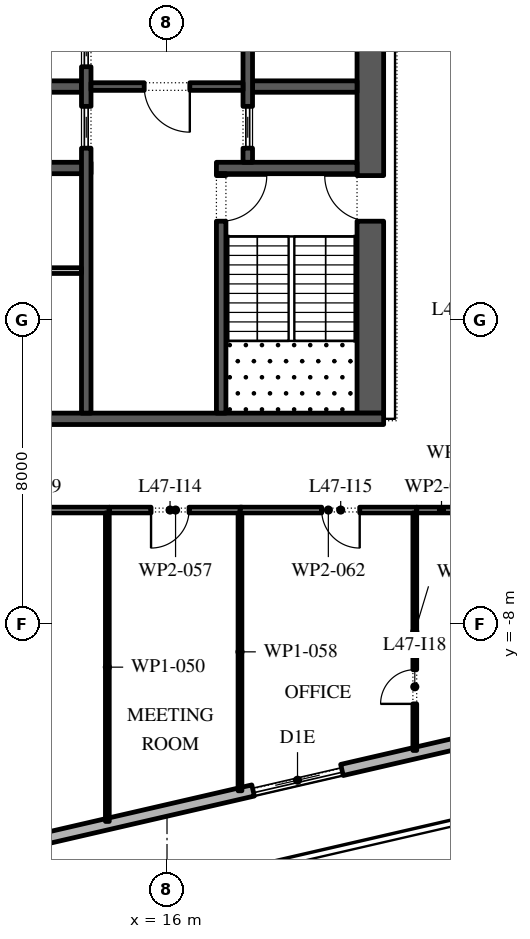
"""IFC4 building model, lengths in metres.
Left out: names, types, materials, properties, quantities, classifications, styles, units other than length and angle.
Written with IfcOpenShell. Run it as: python <this file> out.ifc"""

import sys

from ifc_helpers import new_model, si_unit, direction, frame, frame_2d, origin, place, context, subcontext, project, spatial, rectangle, extrude, element, fill, save


model = new_model("IFC4")
c1 = context("Model", 3, precision=1e-05, world=origin(), true_north=direction((0.0, 1.0)))
c2 = subcontext(c1, "Body", "Model", "MODEL_VIEW")
j1 = project(units=[si_unit("LENGTHUNIT", "METRE"), si_unit("PLANEANGLEUNIT", "RADIAN")], contexts=[c1])
p1 = place(None, origin())
s1 = spatial("IfcSite", under=j1, at=p1, CompositionType="ELEMENT")
p2 = place(p1, origin())
s2 = spatial("IfcBuilding", under=s1, at=p2, CompositionType="ELEMENT")
p3 = place(p2, frame((0.0, 0.0, 213.6)))
s3 = spatial("IfcBuildingStorey", under=s2, at=p3, CompositionType="ELEMENT", Elevation=213.6)
p4 = place(p3, frame((-17.592, -20.657, 0.0), z_axis=(0.0, 0.0, 1.0), x_axis=(0.974370243697, 0.224950279389, 0.0)))
e1 = element("IfcWall", 1, at=p4, inside=s3, PredefinedType="STANDARD", context=c2, shape_type="SweptSolid", body=[
    extrude(rectangle(XDim=49.5, YDim=0.3, at=frame_2d((24.75, 0.0))), origin(), (0.0, 0.0, 1.0), 4.0),
])
p5 = place(p4, frame((2.8, 0.0, 0.0)))
e2 = element("IfcOpeningElement", 2, at=p5, cuts=e1, PredefinedType="OPENING", context=c2, shape_type="SweptSolid", body=[
    extrude(rectangle(XDim=2.4, YDim=3.5, at=frame_2d((1.2, 1.75))), frame((0.0, 0.16, 0.0), z_axis=(0.0, -1.0, 0.0), x_axis=(1.0, 0.0, 0.0)), (0.0, 0.0, 1.0), 0.32),
])
p6 = place(p4, frame((9.9, 0.0, 0.45)))
e3 = element("IfcOpeningElement", 3, at=p6, cuts=e1, PredefinedType="OPENING", context=c2, shape_type="SweptSolid", body=[
    extrude(rectangle(XDim=4.5, YDim=2.575, at=frame_2d((2.25, 1.288))), frame((0.0, 0.16, 0.0), z_axis=(0.0, -1.0, 0.0), x_axis=(1.0, 0.0, 0.0)), (0.0, 0.0, 1.0), 0.32),
])
p7 = place(p4, frame((18.2, 0.0, 0.45)))
e4 = element("IfcOpeningElement", 4, at=p7, cuts=e1, PredefinedType="OPENING", context=c2, shape_type="SweptSolid", body=[
    extrude(rectangle(XDim=4.5, YDim=2.675, at=frame_2d((2.25, 1.337))), frame((0.0, 0.16, 0.0), z_axis=(0.0, -1.0, 0.0), x_axis=(1.0, 0.0, 0.0)), (0.0, 0.0, 1.0), 0.32),
])
p8 = place(p4, frame((26.5, 0.0, 0.45)))
e5 = element("IfcOpeningElement", 5, at=p8, cuts=e1, PredefinedType="OPENING", context=c2, shape_type="SweptSolid", body=[
    extrude(rectangle(XDim=4.5, YDim=2.75, at=frame_2d((2.25, 1.375))), frame((0.0, 0.16, 0.0), z_axis=(0.0, -1.0, 0.0), x_axis=(1.0, 0.0, 0.0)), (0.0, 0.0, 1.0), 0.32),
])
p9 = place(p4, frame((36.8, 0.0, 0.0)))
e6 = element("IfcOpeningElement", 6, at=p9, cuts=e1, PredefinedType="OPENING", context=c2, shape_type="SweptSolid", body=[
    extrude(rectangle(XDim=2.4, YDim=3.275, at=frame_2d((1.2, 1.637))), frame((0.0, 0.16, 0.0), z_axis=(0.0, -1.0, 0.0), x_axis=(1.0, 0.0, 0.0)), (0.0, 0.0, 1.0), 0.32),
])
p10 = place(p4, frame((43.1, 0.0, 0.45)))
e7 = element("IfcOpeningElement", 7, at=p10, cuts=e1, PredefinedType="OPENING", context=c2, shape_type="SweptSolid", body=[
    extrude(rectangle(XDim=4.5, YDim=2.875, at=frame_2d((2.25, 1.438))), frame((0.0, 0.16, 0.0), z_axis=(0.0, -1.0, 0.0), x_axis=(1.0, 0.0, 0.0)), (0.0, 0.0, 1.0), 0.32),
])
p11 = place(p3, frame((33.157, -5.092, 0.0), z_axis=(0.0, 0.0, 1.0), x_axis=(-0.224950279389, 0.974370243697, 0.0)))
e8 = element("IfcWall", 8, at=p11, inside=s3, PredefinedType="STANDARD", context=c2, shape_type="SweptSolid", body=[
    extrude(rectangle(XDim=49.5, YDim=0.3, at=frame_2d((24.75, 0.0))), origin(), (0.0, 0.0, 1.0), 4.0),
])
p12 = place(p11, frame((2.207, 0.0, 0.0)))
e9 = element("IfcOpeningElement", 9, at=p12, cuts=e8, PredefinedType="OPENING", context=c2, shape_type="SweptSolid", body=[
    extrude(rectangle(XDim=2.4, YDim=3.125, at=frame_2d((1.2, 1.562))), frame((0.0, 0.16, 0.0), z_axis=(0.0, -1.0, 0.0), x_axis=(1.0, 0.0, 0.0)), (0.0, 0.0, 1.0), 0.32),
])
p13 = place(p11, frame((8.121, 0.0, 0.45)))
e10 = element("IfcOpeningElement", 10, at=p13, cuts=e8, PredefinedType="OPENING", context=c2, shape_type="SweptSolid", body=[
    extrude(rectangle(XDim=4.5, YDim=2.875, at=frame_2d((2.25, 1.438))), frame((0.0, 0.16, 0.0), z_axis=(0.0, -1.0, 0.0), x_axis=(1.0, 0.0, 0.0)), (0.0, 0.0, 1.0), 0.32),
])
p14 = place(p11, frame((15.236, 0.0, 0.45)))
e11 = element("IfcOpeningElement", 11, at=p14, cuts=e8, PredefinedType="OPENING", context=c2, shape_type="SweptSolid", body=[
    extrude(rectangle(XDim=4.5, YDim=2.875, at=frame_2d((2.25, 1.438))), frame((0.0, 0.16, 0.0), z_axis=(0.0, -1.0, 0.0), x_axis=(1.0, 0.0, 0.0)), (0.0, 0.0, 1.0), 0.32),
])
p15 = place(p11, frame((22.35, 0.0, 0.45)))
e12 = element("IfcOpeningElement", 12, at=p15, cuts=e8, PredefinedType="OPENING", context=c2, shape_type="SweptSolid", body=[
    extrude(rectangle(XDim=4.5, YDim=3.0, at=frame_2d((2.25, 1.5))), frame((0.0, 0.16, 0.0), z_axis=(0.0, -1.0, 0.0), x_axis=(1.0, 0.0, 0.0)), (0.0, 0.0, 1.0), 0.32),
])
p16 = place(p11, frame((30.514, 0.0, 0.0)))
e13 = element("IfcOpeningElement", 13, at=p16, cuts=e8, PredefinedType="OPENING", context=c2, shape_type="SweptSolid", body=[
    extrude(rectangle(XDim=2.4, YDim=3.45, at=frame_2d((1.2, 1.725))), frame((0.0, 0.16, 0.0), z_axis=(0.0, -1.0, 0.0), x_axis=(1.0, 0.0, 0.0)), (0.0, 0.0, 1.0), 0.32),
])
p17 = place(p11, frame((36.579, 0.0, 0.45)))
e14 = element("IfcOpeningElement", 14, at=p17, cuts=e8, PredefinedType="OPENING", context=c2, shape_type="SweptSolid", body=[
    extrude(rectangle(XDim=4.5, YDim=3.05, at=frame_2d((2.25, 1.525))), frame((0.0, 0.16, 0.0), z_axis=(0.0, -1.0, 0.0), x_axis=(1.0, 0.0, 0.0)), (0.0, 0.0, 1.0), 0.32),
])
p18 = place(p11, frame((43.693, 0.0, 0.45)))
e15 = element("IfcOpeningElement", 15, at=p18, cuts=e8, PredefinedType="OPENING", context=c2, shape_type="SweptSolid", body=[
    extrude(rectangle(XDim=4.5, YDim=3.05, at=frame_2d((2.25, 1.525))), frame((0.0, 0.16, 0.0), z_axis=(0.0, -1.0, 0.0), x_axis=(1.0, 0.0, 0.0)), (0.0, 0.0, 1.0), 0.32),
])
p19 = place(p3, frame((21.35, -2.45, 0.0), z_axis=(0.0, 0.0, 1.0), x_axis=(0.0, 1.0, 0.0)))
e16 = element("IfcWall", 16, at=p19, inside=s3, PredefinedType="SHEAR", context=c2, shape_type="SweptSolid", body=[
    extrude(rectangle(XDim=27.9, YDim=0.7, at=frame_2d((13.95, 0.0))), origin(), (0.0, 0.0, 1.0), 4.0),
])
p20 = place(p19, frame((5.05, 0.0, 0.0)))
e17 = element("IfcOpeningElement", 17, at=p20, cuts=e16, PredefinedType="OPENING", context=c2, shape_type="SweptSolid", body=[
    extrude(rectangle(XDim=1.2, YDim=2.1, at=frame_2d((0.6, 1.05))), frame((0.0, 0.36, 0.0), z_axis=(0.0, -1.0, 0.0), x_axis=(1.0, 0.0, 0.0)), (0.0, 0.0, 1.0), 0.72),
])
p21 = place(p19, frame((21.65, 0.0, 0.0)))
e18 = element("IfcOpeningElement", 18, at=p21, cuts=e16, PredefinedType="OPENING", context=c2, shape_type="SweptSolid", body=[
    extrude(rectangle(XDim=1.2, YDim=2.1, at=frame_2d((0.6, 1.05))), frame((0.0, 0.36, 0.0), z_axis=(0.0, -1.0, 0.0), x_axis=(1.0, 0.0, 0.0)), (0.0, 0.0, 1.0), 0.72),
])
p22 = place(p3, frame((10.3, -2.6, 0.0), z_axis=(0.0, 0.0, 1.0), x_axis=(1.0, 0.0, 0.0)))
e19 = element("IfcWall", 19, at=p22, inside=s3, PredefinedType="SHEAR", context=c2, shape_type="SweptSolid", body=[
    extrude(rectangle(XDim=11.4, YDim=0.3, at=frame_2d((5.7, 0.0))), origin(), (0.0, 0.0, 1.0), 4.0),
])
p23 = place(p3, frame((17.3, 4.0, 0.0), z_axis=(0.0, 0.0, 1.0), x_axis=(1.0, 0.0, 0.0)))
e20 = element("IfcWall", 20, at=p23, inside=s3, PredefinedType="SHEAR", context=c2, shape_type="SweptSolid", body=[
    extrude(rectangle(XDim=3.7, YDim=0.3, at=frame_2d((1.85, 0.0))), origin(), (0.0, 0.0, 1.0), 4.0),
])
p24 = place(p3, frame((17.425, -2.45, 0.0), z_axis=(0.0, 0.0, 1.0), x_axis=(0.0, 1.0, 0.0)))
e21 = element("IfcWall", 21, at=p24, inside=s3, PredefinedType="SHEAR", context=c2, shape_type="SweptSolid", body=[
    extrude(rectangle(XDim=6.3, YDim=0.25, at=frame_2d((3.15, 0.0))), origin(), (0.0, 0.0, 1.0), 4.0),
])
p25 = place(p24, frame((5.05, 0.0, 0.0)))
e22 = element("IfcOpeningElement", 22, at=p25, cuts=e21, PredefinedType="OPENING", context=c2, shape_type="SweptSolid", body=[
    extrude(rectangle(XDim=1.2, YDim=2.1, at=frame_2d((0.6, 1.05))), frame((0.0, 0.135, 0.0), z_axis=(0.0, -1.0, 0.0), x_axis=(1.0, 0.0, 0.0)), (0.0, 0.0, 1.0), 0.27),
])
p26 = place(p3, frame((18.25, 6.143, 0.0), z_axis=(0.0, 0.0, 1.0), x_axis=(1.0, 0.0, 0.0)))
e23 = element("IfcWall", 23, at=p26, inside=s3, PredefinedType="SHEAR", context=c2, shape_type="SweptSolid", body=[
    extrude(rectangle(XDim=2.75, YDim=0.3, at=frame_2d((1.375, 0.0))), origin(), (0.0, 0.0, 1.0), 4.0),
])
p27 = place(p3, frame((18.125, 4.15, 0.0), z_axis=(0.0, 0.0, 1.0), x_axis=(0.0, 1.0, 0.0)))
e24 = element("IfcWall", 24, at=p27, inside=s3, PredefinedType="SHEAR", context=c2, shape_type="SweptSolid", body=[
    extrude(rectangle(XDim=14.7, YDim=0.25, at=frame_2d((7.35, 0.0))), origin(), (0.0, 0.0, 1.0), 4.0),
])
p28 = place(p27, frame((3.446, 0.0, 0.0)))
e25 = element("IfcOpeningElement", 25, at=p28, cuts=e24, PredefinedType="OPENING", context=c2, shape_type="SweptSolid", body=[
    extrude(rectangle(XDim=0.9, YDim=2.1, at=frame_2d((0.45, 1.05))), frame((0.0, 0.135, 0.0), z_axis=(0.0, -1.0, 0.0), x_axis=(1.0, 0.0, 0.0)), (0.0, 0.0, 1.0), 0.27),
])
p29 = place(p27, frame((6.9, 0.0, 0.0)))
e26 = element("IfcOpeningElement", 26, at=p29, cuts=e24, PredefinedType="OPENING", context=c2, shape_type="SweptSolid", body=[
    extrude(rectangle(XDim=0.9, YDim=2.1, at=frame_2d((0.45, 1.05))), frame((0.0, 0.135, 0.0), z_axis=(0.0, -1.0, 0.0), x_axis=(1.0, 0.0, 0.0)), (0.0, 0.0, 1.0), 0.27),
])
p30 = place(p27, frame((10.354, 0.0, 0.0)))
e27 = element("IfcOpeningElement", 27, at=p30, cuts=e24, PredefinedType="OPENING", context=c2, shape_type="SweptSolid", body=[
    extrude(rectangle(XDim=0.9, YDim=2.1, at=frame_2d((0.45, 1.05))), frame((0.0, 0.135, 0.0), z_axis=(0.0, -1.0, 0.0), x_axis=(1.0, 0.0, 0.0)), (0.0, 0.0, 1.0), 0.27),
])
p31 = place(p27, frame((0.371, 0.0, 0.0)))
e28 = element("IfcOpeningElement", 28, at=p31, cuts=e24, PredefinedType="OPENING", context=c2, shape_type="SweptSolid", body=[
    extrude(rectangle(XDim=1.1, YDim=2.1, at=frame_2d((0.55, 1.05))), frame((0.0, 0.135, 0.0), z_axis=(0.0, -1.0, 0.0), x_axis=(1.0, 0.0, 0.0)), (0.0, 0.0, 1.0), 0.27),
])
p32 = place(p27, frame((13.229, 0.0, 0.0)))
e29 = element("IfcOpeningElement", 29, at=p32, cuts=e24, PredefinedType="OPENING", context=c2, shape_type="SweptSolid", body=[
    extrude(rectangle(XDim=1.1, YDim=2.1, at=frame_2d((0.55, 1.05))), frame((0.0, 0.135, 0.0), z_axis=(0.0, -1.0, 0.0), x_axis=(1.0, 0.0, 0.0)), (0.0, 0.0, 1.0), 0.27),
])
p33 = place(p3, frame((11.0, 4.0, 0.0), z_axis=(0.0, 0.0, 1.0), x_axis=(1.0, 0.0, 0.0)))
e30 = element("IfcWall", 30, at=p33, inside=s3, PredefinedType="SHEAR", context=c2, shape_type="SweptSolid", body=[
    extrude(rectangle(XDim=3.0, YDim=0.3, at=frame_2d((1.5, 0.0))), origin(), (0.0, 0.0, 1.0), 4.0),
])
p34 = place(p3, frame((11.0, 6.143, 0.0), z_axis=(0.0, 0.0, 1.0), x_axis=(1.0, 0.0, 0.0)))
e31 = element("IfcWall", 31, at=p34, inside=s3, PredefinedType="SHEAR", context=c2, shape_type="SweptSolid", body=[
    extrude(rectangle(XDim=2.75, YDim=0.3, at=frame_2d((1.375, 0.0))), origin(), (0.0, 0.0, 1.0), 4.0),
])
p35 = place(p3, frame((13.875, -2.45, 0.0), z_axis=(0.0, 0.0, 1.0), x_axis=(0.0, 1.0, 0.0)))
e32 = element("IfcWall", 32, at=p35, inside=s3, PredefinedType="SHEAR", context=c2, shape_type="SweptSolid", body=[
    extrude(rectangle(XDim=21.3, YDim=0.25, at=frame_2d((10.65, 0.0))), origin(), (0.0, 0.0, 1.0), 4.0),
])
p36 = place(p35, frame((17.786, 0.0, 0.0)))
e33 = element("IfcOpeningElement", 33, at=p36, cuts=e32, PredefinedType="OPENING", context=c2, shape_type="SweptSolid", body=[
    extrude(rectangle(XDim=0.9, YDim=2.1, at=frame_2d((0.45, 1.05))), frame((0.0, 0.135, 0.0), z_axis=(0.0, -1.0, 0.0), x_axis=(1.0, 0.0, 0.0)), (0.0, 0.0, 1.0), 0.27),
])
p37 = place(p35, frame((6.971, 0.0, 0.0)))
e34 = element("IfcOpeningElement", 34, at=p37, cuts=e32, PredefinedType="OPENING", context=c2, shape_type="SweptSolid", body=[
    extrude(rectangle(XDim=1.1, YDim=2.1, at=frame_2d((0.55, 1.05))), frame((0.0, 0.135, 0.0), z_axis=(0.0, -1.0, 0.0), x_axis=(1.0, 0.0, 0.0)), (0.0, 0.0, 1.0), 0.27),
])
p38 = place(p35, frame((9.114, 0.0, 0.0)))
e35 = element("IfcOpeningElement", 35, at=p38, cuts=e32, PredefinedType="OPENING", context=c2, shape_type="SweptSolid", body=[
    extrude(rectangle(XDim=1.1, YDim=2.1, at=frame_2d((0.55, 1.05))), frame((0.0, 0.135, 0.0), z_axis=(0.0, -1.0, 0.0), x_axis=(1.0, 0.0, 0.0)), (0.0, 0.0, 1.0), 0.27),
])
p39 = place(p35, frame((11.257, 0.0, 0.0)))
e36 = element("IfcOpeningElement", 36, at=p39, cuts=e32, PredefinedType="OPENING", context=c2, shape_type="SweptSolid", body=[
    extrude(rectangle(XDim=1.1, YDim=2.1, at=frame_2d((0.55, 1.05))), frame((0.0, 0.135, 0.0), z_axis=(0.0, -1.0, 0.0), x_axis=(1.0, 0.0, 0.0)), (0.0, 0.0, 1.0), 0.27),
])
p40 = place(p35, frame((13.4, 0.0, 0.0)))
e37 = element("IfcOpeningElement", 37, at=p40, cuts=e32, PredefinedType="OPENING", context=c2, shape_type="SweptSolid", body=[
    extrude(rectangle(XDim=1.1, YDim=2.1, at=frame_2d((0.55, 1.05))), frame((0.0, 0.135, 0.0), z_axis=(0.0, -1.0, 0.0), x_axis=(1.0, 0.0, 0.0)), (0.0, 0.0, 1.0), 0.27),
])
p41 = place(p3, frame((14.0, 6.143, 0.0), z_axis=(0.0, 0.0, 1.0), x_axis=(1.0, 0.0, 0.0)))
e38 = element("IfcWall", 38, at=p41, inside=s3, PredefinedType="SHEAR", context=c2, shape_type="SweptSolid", body=[
    extrude(rectangle(XDim=4.0, YDim=0.2, at=frame_2d((2.0, 0.0))), origin(), (0.0, 0.0, 1.0), 4.0),
])
p42 = place(p41, frame((1.4, 0.0, 0.0)))
e39 = element("IfcOpeningElement", 39, at=p42, cuts=e38, PredefinedType="OPENING", context=c2, shape_type="SweptSolid", body=[
    extrude(rectangle(XDim=1.2, YDim=2.1, at=frame_2d((0.6, 1.05))), frame((0.0, 0.11, 0.0), z_axis=(0.0, -1.0, 0.0), x_axis=(1.0, 0.0, 0.0)), (0.0, 0.0, 1.0), 0.22),
])
p43 = place(p3, frame((11.0, 1.3, 0.0), z_axis=(0.0, 0.0, 1.0), x_axis=(1.0, 0.0, 0.0)))
e40 = element("IfcWall", 40, at=p43, inside=s3, PredefinedType="PARTITIONING", context=c2, shape_type="SweptSolid", body=[
    extrude(rectangle(XDim=2.75, YDim=0.15, at=frame_2d((1.375, 0.0))), origin(), (0.0, 0.0, 1.0), 4.0),
])
p44 = place(p3, frame((14.48, -5.0, 0.0), z_axis=(0.0, 0.0, 1.0), x_axis=(-1.0, 0.0, 0.0)))
e41 = element("IfcWall", 41, at=p44, inside=s3, PredefinedType="PARTITIONING", context=c2, shape_type="SweptSolid", body=[
    extrude(rectangle(XDim=4.48, YDim=0.15, at=frame_2d((2.24, 0.0))), origin(), (0.0, 0.0, 1.0), 4.0),
])
p45 = place(p3, frame((14.43, -5.075, 0.0), z_axis=(0.0, 0.0, 1.0), x_axis=(0.0, -1.0, 0.0)))
e42 = element("IfcWall", 42, at=p45, inside=s3, PredefinedType="PARTITIONING", context=c2, shape_type="SweptSolid", body=[
    extrude(rectangle(XDim=8.118, YDim=0.1, at=frame_2d((4.059, 0.0))), origin(), (0.0, 0.0, 1.0), 4.0),
])
p46 = place(p3, frame((17.97, -5.0, 0.0), z_axis=(0.0, 0.0, 1.0), x_axis=(-1.0, 0.0, 0.0)))
e43 = element("IfcWall", 43, at=p46, inside=s3, PredefinedType="PARTITIONING", context=c2, shape_type="SweptSolid", body=[
    extrude(rectangle(XDim=3.49, YDim=0.15, at=frame_2d((1.745, 0.0))), origin(), (0.0, 0.0, 1.0), 4.0),
])
p47 = place(p46, frame((1.39, 0.0, 0.0)))
e44 = element("IfcOpeningElement", 44, at=p47, cuts=e43, PredefinedType="OPENING", context=c2, shape_type="SweptSolid", body=[
    extrude(rectangle(XDim=1.0, YDim=2.1, at=frame_2d((0.5, 1.05))), frame((0.0, 0.085, 0.0), z_axis=(0.0, -1.0, 0.0), x_axis=(1.0, 0.0, 0.0)), (0.0, 0.0, 1.0), 0.17),
])
p48 = place(p3, frame((17.92, -5.075, 0.0), z_axis=(0.0, 0.0, 1.0), x_axis=(0.0, -1.0, 0.0)))
e45 = element("IfcWall", 45, at=p48, inside=s3, PredefinedType="PARTITIONING", context=c2, shape_type="SweptSolid", body=[
    extrude(rectangle(XDim=7.312, YDim=0.1, at=frame_2d((3.656, 0.0))), origin(), (0.0, 0.0, 1.0), 4.0),
])
p49 = place(p3, frame((22.57, -5.0, 0.0), z_axis=(0.0, 0.0, 1.0), x_axis=(-1.0, 0.0, 0.0)))
e46 = element("IfcWall", 46, at=p49, inside=s3, PredefinedType="PARTITIONING", context=c2, shape_type="SweptSolid", body=[
    extrude(rectangle(XDim=4.65, YDim=0.15, at=frame_2d((2.325, 0.0))), origin(), (0.0, 0.0, 1.0), 4.0),
])
p50 = place(p49, frame((1.5, 0.0, 0.0)))
e47 = element("IfcOpeningElement", 47, at=p50, cuts=e46, PredefinedType="OPENING", context=c2, shape_type="SweptSolid", body=[
    extrude(rectangle(XDim=1.0, YDim=2.1, at=frame_2d((0.5, 1.05))), frame((0.0, 0.085, 0.0), z_axis=(0.0, -1.0, 0.0), x_axis=(1.0, 0.0, 0.0)), (0.0, 0.0, 1.0), 0.17),
])
p51 = place(p3, frame((22.52, -5.075, 0.0), z_axis=(0.0, 0.0, 1.0), x_axis=(0.0, -1.0, 0.0)))
e48 = element("IfcWall", 48, at=p51, inside=s3, PredefinedType="PARTITIONING", context=c2, shape_type="SweptSolid", body=[
    extrude(rectangle(XDim=6.25, YDim=0.1, at=frame_2d((3.125, 0.0))), origin(), (0.0, 0.0, 1.0), 4.0),
])
p52 = place(p51, frame((4.125, 0.0, 0.0)))
e49 = element("IfcOpeningElement", 49, at=p52, cuts=e48, PredefinedType="OPENING", context=c2, shape_type="SweptSolid", body=[
    extrude(rectangle(XDim=0.9, YDim=2.1, at=frame_2d((0.45, 1.05))), frame((0.0, 0.06, 0.0), z_axis=(0.0, -1.0, 0.0), x_axis=(1.0, 0.0, 0.0)), (0.0, 0.0, 1.0), 0.12),
])
p53 = place(p3, frame((23.875, -5.0, 0.0), z_axis=(0.0, 0.0, 1.0), x_axis=(-1.0, 0.0, 0.0)))
e50 = element("IfcWall", 50, at=p53, inside=s3, PredefinedType="PARTITIONING", context=c2, shape_type="SweptSolid", body=[
    extrude(rectangle(XDim=1.305, YDim=0.15, at=frame_2d((0.652, 0.0))), origin(), (0.0, 0.0, 1.0), 4.0),
])
p54 = place(p9, origin())
e51 = element("IfcDoor", 51, at=p54, inside=s3, OperationType="DOUBLE_DOOR_SLIDING", PredefinedType="DOOR", context=c2, shape_type="SweptSolid", body=[
    extrude(rectangle(XDim=2.4, YDim=3.275, at=frame_2d((1.2, 1.637))), frame((0.0, 0.025, 0.0), z_axis=(0.0, -1.0, 0.0), x_axis=(1.0, 0.0, 0.0)), (0.0, 0.0, 1.0), 0.05),
])
fill(e6, e51)
p55 = place(p31, origin())
e52 = element("IfcDoor", 52, at=p55, inside=s3, OperationType="SLIDING_TO_LEFT", PredefinedType="DOOR", context=c2, shape_type="SweptSolid", body=[
    extrude(rectangle(XDim=1.1, YDim=2.1, at=frame_2d((0.55, 1.05))), frame((0.0, 0.025, 0.0), z_axis=(0.0, -1.0, 0.0), x_axis=(1.0, 0.0, 0.0)), (0.0, 0.0, 1.0), 0.05),
])
fill(e28, e52)
p56 = place(p37, origin())
e53 = element("IfcDoor", 53, at=p56, inside=s3, OperationType="SLIDING_TO_LEFT", PredefinedType="DOOR", context=c2, shape_type="SweptSolid", body=[
    extrude(rectangle(XDim=1.1, YDim=2.1, at=frame_2d((0.55, 1.05))), frame((0.0, 0.025, 0.0), z_axis=(0.0, -1.0, 0.0), x_axis=(1.0, 0.0, 0.0)), (0.0, 0.0, 1.0), 0.05),
])
fill(e34, e53)
p57 = place(p38, origin())
e54 = element("IfcDoor", 54, at=p57, inside=s3, OperationType="SLIDING_TO_LEFT", PredefinedType="DOOR", context=c2, shape_type="SweptSolid", body=[
    extrude(rectangle(XDim=1.1, YDim=2.1, at=frame_2d((0.55, 1.05))), frame((0.0, 0.025, 0.0), z_axis=(0.0, -1.0, 0.0), x_axis=(1.0, 0.0, 0.0)), (0.0, 0.0, 1.0), 0.05),
])
fill(e35, e54)
p58 = place(p42, frame((1.2, 0.0, 0.0), z_axis=(0.0, 0.0, 1.0), x_axis=(-1.0, 0.0, 0.0)))
e55 = element("IfcDoor", 55, at=p58, inside=s3, OperationType="SINGLE_SWING_RIGHT", PredefinedType="DOOR", context=c2, shape_type="SweptSolid", body=[
    extrude(rectangle(XDim=1.2, YDim=2.1, at=frame_2d((0.6, 1.05))), frame((0.0, 0.025, 0.0), z_axis=(0.0, -1.0, 0.0), x_axis=(1.0, 0.0, 0.0)), (0.0, 0.0, 1.0), 0.05),
])
fill(e39, e55)
p59 = place(p25, frame((1.2, 0.0, 0.0), z_axis=(0.0, 0.0, 1.0), x_axis=(-1.0, 0.0, 0.0)))
e56 = element("IfcDoor", 56, at=p59, inside=s3, OperationType="SINGLE_SWING_RIGHT", PredefinedType="DOOR", context=c2, shape_type="SweptSolid", body=[
    extrude(rectangle(XDim=1.2, YDim=2.1, at=frame_2d((0.6, 1.05))), frame((0.0, 0.025, 0.0), z_axis=(0.0, -1.0, 0.0), x_axis=(1.0, 0.0, 0.0)), (0.0, 0.0, 1.0), 0.05),
])
fill(e22, e56)
p60 = place(p20, origin())
e57 = element("IfcDoor", 57, at=p60, inside=s3, OperationType="SINGLE_SWING_LEFT", PredefinedType="DOOR", context=c2, shape_type="SweptSolid", body=[
    extrude(rectangle(XDim=1.2, YDim=2.1, at=frame_2d((0.6, 1.05))), frame((0.0, 0.025, 0.0), z_axis=(0.0, -1.0, 0.0), x_axis=(1.0, 0.0, 0.0)), (0.0, 0.0, 1.0), 0.05),
])
fill(e17, e57)
p61 = place(p47, origin())
e58 = element("IfcDoor", 58, at=p61, inside=s3, OperationType="SINGLE_SWING_LEFT", PredefinedType="DOOR", context=c2, shape_type="SweptSolid", body=[
    extrude(rectangle(XDim=1.0, YDim=2.1, at=frame_2d((0.5, 1.05))), frame((0.0, 0.025, 0.0), z_axis=(0.0, -1.0, 0.0), x_axis=(1.0, 0.0, 0.0)), (0.0, 0.0, 1.0), 0.05),
])
fill(e44, e58)
p62 = place(p50, origin())
e59 = element("IfcDoor", 59, at=p62, inside=s3, OperationType="SINGLE_SWING_RIGHT", PredefinedType="DOOR", context=c2, shape_type="SweptSolid", body=[
    extrude(rectangle(XDim=1.0, YDim=2.1, at=frame_2d((0.5, 1.05))), frame((0.0, 0.025, 0.0), z_axis=(0.0, -1.0, 0.0), x_axis=(1.0, 0.0, 0.0)), (0.0, 0.0, 1.0), 0.05),
])
fill(e47, e59)
p63 = place(p52, frame((0.9, 0.0, 0.0), z_axis=(0.0, 0.0, 1.0), x_axis=(-1.0, 0.0, 0.0)))
e60 = element("IfcDoor", 60, at=p63, inside=s3, OperationType="SINGLE_SWING_RIGHT", PredefinedType="DOOR", context=c2, shape_type="SweptSolid", body=[
    extrude(rectangle(XDim=0.9, YDim=2.1, at=frame_2d((0.45, 1.05))), frame((0.0, 0.025, 0.0), z_axis=(0.0, -1.0, 0.0), x_axis=(1.0, 0.0, 0.0)), (0.0, 0.0, 1.0), 0.05),
])
fill(e49, e60)
save(model, sys.argv[1])
